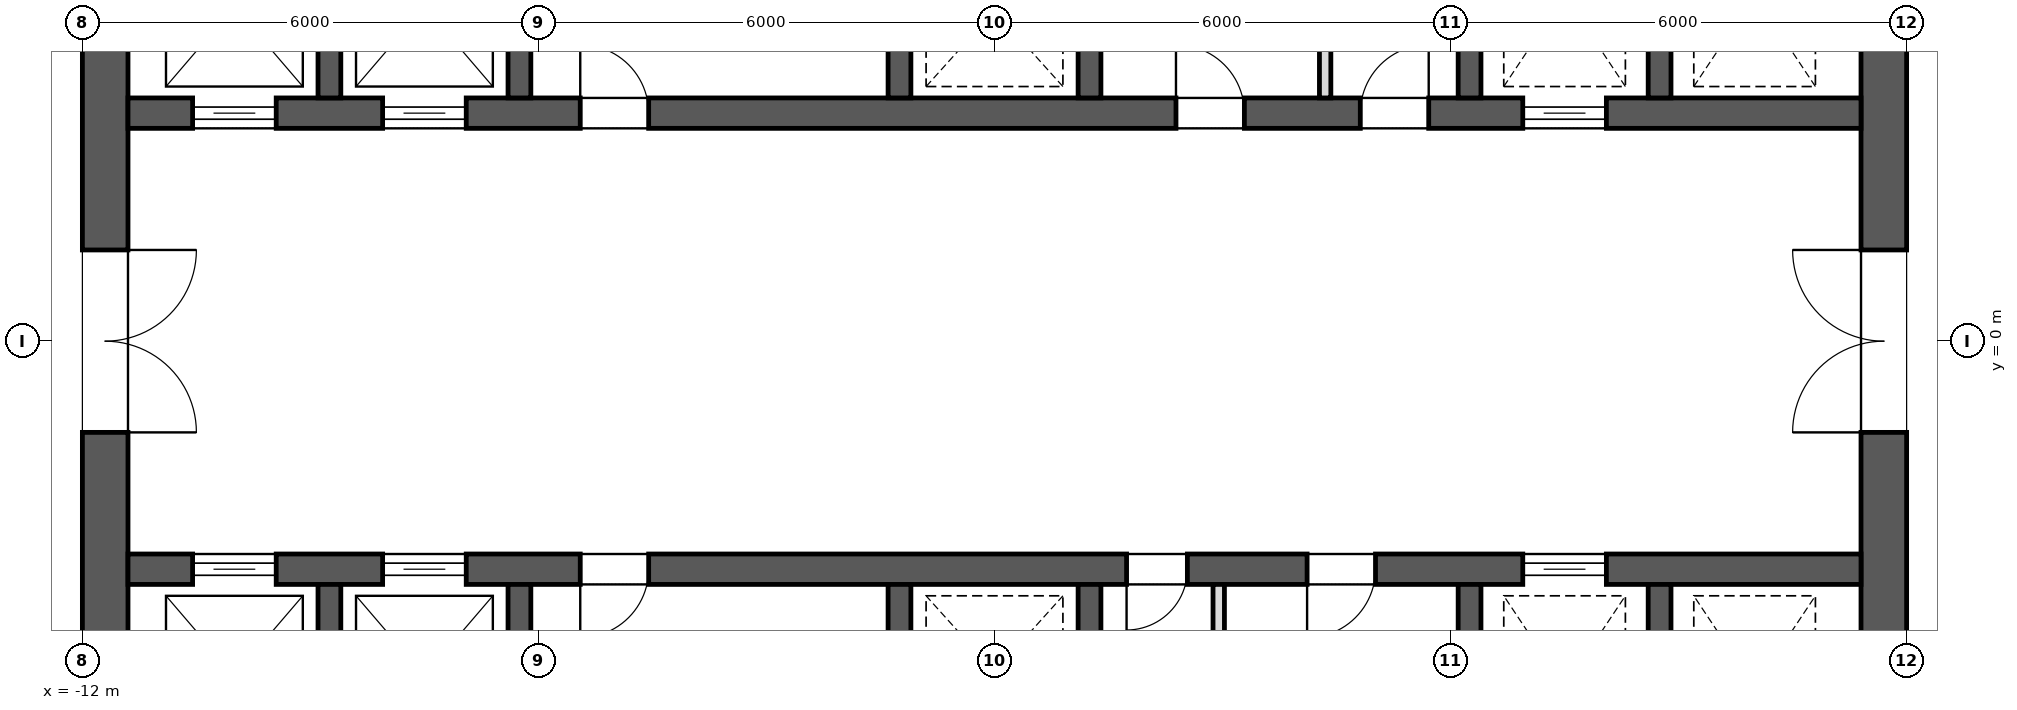
"""IFC4 building model, lengths in metres.
Left out: names, types, materials, properties, quantities, classifications, styles, units other than length and angle.
Written with IfcOpenShell. Run it as: python <this file> out.ifc"""

import sys

from ifc_helpers import new_model, si_unit, direction, frame, frame_2d, origin, place, context, subcontext, project, spatial, rectangle, extrude, element, fill, save


model = new_model("IFC4")
c1 = context("Model", 3, precision=1e-05, world=origin(), true_north=direction((0.0, 1.0)))
c2 = subcontext(c1, "Body", "Model", "MODEL_VIEW")
j1 = project(units=[si_unit("LENGTHUNIT", "METRE"), si_unit("PLANEANGLEUNIT", "RADIAN")], contexts=[c1])
p1 = place(None, origin())
s1 = spatial("IfcSite", under=j1, at=p1, CompositionType="ELEMENT")
p2 = place(p1, origin())
s2 = spatial("IfcBuilding", under=s1, at=p2, CompositionType="ELEMENT")
p3 = place(p2, frame((0.0, 0.0, 280.3)))
s3 = spatial("IfcBuildingStorey", under=s2, at=p3, CompositionType="ELEMENT", Elevation=280.3)
p4 = place(p3, frame((11.7, -11.4, 0.0), z_axis=(0.0, 0.0, 1.0), x_axis=(0.0, 1.0, 0.0)))
e1 = element("IfcWall", 1, at=p4, inside=s3, PredefinedType="SHEAR", context=c2, shape_type="SweptSolid", body=[
    extrude(rectangle(XDim=22.8, YDim=0.6, at=frame_2d((11.4, 0.0))), origin(), (0.0, 0.0, 1.0), 4.0),
])
p5 = place(p4, frame((10.2, 0.0, 0.0)))
e2 = element("IfcOpeningElement", 2, at=p5, cuts=e1, PredefinedType="OPENING", context=c2, shape_type="SweptSolid", body=[
    extrude(rectangle(XDim=2.4, YDim=2.1, at=frame_2d((1.2, 1.05))), frame((0.0, 0.312, 0.0), z_axis=(0.0, -1.0, 0.0), x_axis=(1.0, 0.0, 0.0)), (0.0, 0.0, 1.0), 0.624),
])
p6 = place(p4, frame((19.5, 0.0, 0.0)))
e3 = element("IfcOpeningElement", 3, at=p6, cuts=e1, PredefinedType="OPENING", context=c2, shape_type="SweptSolid", body=[
    extrude(rectangle(XDim=1.2, YDim=2.1, at=frame_2d((0.6, 1.05))), frame((0.0, 0.312, 0.0), z_axis=(0.0, -1.0, 0.0), x_axis=(1.0, 0.0, 0.0)), (0.0, 0.0, 1.0), 0.624),
])
p7 = place(p4, frame((2.1, 0.0, 0.0)))
e4 = element("IfcOpeningElement", 4, at=p7, cuts=e1, PredefinedType="OPENING", context=c2, shape_type="SweptSolid", body=[
    extrude(rectangle(XDim=1.2, YDim=2.1, at=frame_2d((0.6, 1.05))), frame((0.0, 0.312, 0.0), z_axis=(0.0, -1.0, 0.0), x_axis=(1.0, 0.0, 0.0)), (0.0, 0.0, 1.0), 0.624),
])
p8 = place(p3, frame((-11.7, -11.4, 0.0), z_axis=(0.0, 0.0, 1.0), x_axis=(0.0, 1.0, 0.0)))
e5 = element("IfcWall", 5, at=p8, inside=s3, PredefinedType="SHEAR", context=c2, shape_type="SweptSolid", body=[
    extrude(rectangle(XDim=22.8, YDim=0.6, at=frame_2d((11.4, 0.0))), origin(), (0.0, 0.0, 1.0), 4.0),
])
p9 = place(p8, frame((10.2, 0.0, 0.0)))
e6 = element("IfcOpeningElement", 6, at=p9, cuts=e5, PredefinedType="OPENING", context=c2, shape_type="SweptSolid", body=[
    extrude(rectangle(XDim=2.4, YDim=2.1, at=frame_2d((1.2, 1.05))), frame((0.0, 0.312, 0.0), z_axis=(0.0, -1.0, 0.0), x_axis=(1.0, 0.0, 0.0)), (0.0, 0.0, 1.0), 0.624),
])
p10 = place(p8, frame((18.925, 0.0, 0.0)))
e7 = element("IfcOpeningElement", 7, at=p10, cuts=e5, PredefinedType="OPENING", context=c2, shape_type="SweptSolid", body=[
    extrude(rectangle(XDim=1.2, YDim=2.1, at=frame_2d((0.6, 1.05))), frame((0.0, 0.312, 0.0), z_axis=(0.0, -1.0, 0.0), x_axis=(1.0, 0.0, 0.0)), (0.0, 0.0, 1.0), 0.624),
])
p11 = place(p8, frame((2.675, 0.0, 0.0)))
e8 = element("IfcOpeningElement", 8, at=p11, cuts=e5, PredefinedType="OPENING", context=c2, shape_type="SweptSolid", body=[
    extrude(rectangle(XDim=1.2, YDim=2.1, at=frame_2d((0.6, 1.05))), frame((0.0, 0.312, 0.0), z_axis=(0.0, -1.0, 0.0), x_axis=(1.0, 0.0, 0.0)), (0.0, 0.0, 1.0), 0.624),
])
p12 = place(p3, frame((-11.4, 3.0, 0.0), z_axis=(0.0, 0.0, 1.0), x_axis=(1.0, 0.0, 0.0)))
e9 = element("IfcWall", 9, at=p12, inside=s3, PredefinedType="SHEAR", context=c2, shape_type="SweptSolid", body=[
    extrude(rectangle(XDim=22.8, YDim=0.4, at=frame_2d((11.4, 0.0))), origin(), (0.0, 0.0, 1.0), 4.0),
])
p13 = place(p12, frame((0.85, 0.0, 0.0)))
e10 = element("IfcOpeningElement", 10, at=p13, cuts=e9, PredefinedType="OPENING", context=c2, shape_type="SweptSolid", body=[
    extrude(rectangle(XDim=1.1, YDim=2.1, at=frame_2d((0.55, 1.05))), frame((0.0, 0.212, 0.0), z_axis=(0.0, -1.0, 0.0), x_axis=(1.0, 0.0, 0.0)), (0.0, 0.0, 1.0), 0.424),
])
p14 = place(p12, frame((3.35, 0.0, 0.0)))
e11 = element("IfcOpeningElement", 11, at=p14, cuts=e9, PredefinedType="OPENING", context=c2, shape_type="SweptSolid", body=[
    extrude(rectangle(XDim=1.1, YDim=2.1, at=frame_2d((0.55, 1.05))), frame((0.0, 0.212, 0.0), z_axis=(0.0, -1.0, 0.0), x_axis=(1.0, 0.0, 0.0)), (0.0, 0.0, 1.0), 0.424),
])
p15 = place(p12, frame((18.35, 0.0, 0.0)))
e12 = element("IfcOpeningElement", 12, at=p15, cuts=e9, PredefinedType="OPENING", context=c2, shape_type="SweptSolid", body=[
    extrude(rectangle(XDim=1.1, YDim=2.1, at=frame_2d((0.55, 1.05))), frame((0.0, 0.212, 0.0), z_axis=(0.0, -1.0, 0.0), x_axis=(1.0, 0.0, 0.0)), (0.0, 0.0, 1.0), 0.424),
])
p16 = place(p12, frame((13.788, 0.0, 0.0)))
e13 = element("IfcOpeningElement", 13, at=p16, cuts=e9, PredefinedType="OPENING", context=c2, shape_type="SweptSolid", body=[
    extrude(rectangle(XDim=0.9, YDim=2.1, at=frame_2d((0.45, 1.05))), frame((0.0, 0.212, 0.0), z_axis=(0.0, -1.0, 0.0), x_axis=(1.0, 0.0, 0.0)), (0.0, 0.0, 1.0), 0.424),
])
p17 = place(p12, frame((16.212, 0.0, 0.0)))
e14 = element("IfcOpeningElement", 14, at=p17, cuts=e9, PredefinedType="OPENING", context=c2, shape_type="SweptSolid", body=[
    extrude(rectangle(XDim=0.9, YDim=2.1, at=frame_2d((0.45, 1.05))), frame((0.0, 0.212, 0.0), z_axis=(0.0, -1.0, 0.0), x_axis=(1.0, 0.0, 0.0)), (0.0, 0.0, 1.0), 0.424),
])
p18 = place(p12, frame((5.95, 0.0, 0.0)))
e15 = element("IfcOpeningElement", 15, at=p18, cuts=e9, PredefinedType="OPENING", context=c2, shape_type="SweptSolid", body=[
    extrude(rectangle(XDim=0.9, YDim=2.1, at=frame_2d((0.45, 1.05))), frame((0.0, 0.212, 0.0), z_axis=(0.0, -1.0, 0.0), x_axis=(1.0, 0.0, 0.0)), (0.0, 0.0, 1.0), 0.424),
])
for number, where, z_axis, x_axis in (
    (16, (-8.75, 3.2, 0.0), (0.0, 0.0, 1.0), (0.0, 1.0, 0.0)),
    (17, (-6.25, 3.2, 0.0), (0.0, 0.0, 1.0), (0.0, 1.0, 0.0)),
    (18, (-1.25, 3.2, 0.0), (0.0, 0.0, 1.0), (0.0, 1.0, 0.0)),
    (19, (1.25, 3.2, 0.0), (0.0, 0.0, 1.0), (0.0, 1.0, 0.0)),
    (20, (6.25, 3.2, 0.0), (0.0, 0.0, 1.0), (0.0, 1.0, 0.0)),
    (21, (8.75, 3.2, 0.0), (0.0, 0.0, 1.0), (0.0, 1.0, 0.0)),
):
    element("IfcWall", number, at=place(p3, frame(where, z_axis=z_axis, x_axis=x_axis)), inside=s3, PredefinedType="SHEAR", context=c2, shape_type="SweptSolid", body=[
        extrude(rectangle(XDim=2.9, YDim=0.3, at=frame_2d((1.45, 0.0))), origin(), (0.0, 0.0, 1.0), 4.0),
    ])
p19 = place(p3, frame((-11.4, -3.0, 0.0), z_axis=(0.0, 0.0, 1.0), x_axis=(1.0, 0.0, 0.0)))
e22 = element("IfcWall", 22, at=p19, inside=s3, PredefinedType="SHEAR", context=c2, shape_type="SweptSolid", body=[
    extrude(rectangle(XDim=22.8, YDim=0.4, at=frame_2d((11.4, 0.0))), origin(), (0.0, 0.0, 1.0), 4.0),
])
p20 = place(p19, frame((0.85, 0.0, 0.0)))
e23 = element("IfcOpeningElement", 23, at=p20, cuts=e22, PredefinedType="OPENING", context=c2, shape_type="SweptSolid", body=[
    extrude(rectangle(XDim=1.1, YDim=2.1, at=frame_2d((0.55, 1.05))), frame((0.0, 0.212, 0.0), z_axis=(0.0, -1.0, 0.0), x_axis=(1.0, 0.0, 0.0)), (0.0, 0.0, 1.0), 0.424),
])
p21 = place(p19, frame((3.35, 0.0, 0.0)))
e24 = element("IfcOpeningElement", 24, at=p21, cuts=e22, PredefinedType="OPENING", context=c2, shape_type="SweptSolid", body=[
    extrude(rectangle(XDim=1.1, YDim=2.1, at=frame_2d((0.55, 1.05))), frame((0.0, 0.212, 0.0), z_axis=(0.0, -1.0, 0.0), x_axis=(1.0, 0.0, 0.0)), (0.0, 0.0, 1.0), 0.424),
])
p22 = place(p19, frame((18.35, 0.0, 0.0)))
e25 = element("IfcOpeningElement", 25, at=p22, cuts=e22, PredefinedType="OPENING", context=c2, shape_type="SweptSolid", body=[
    extrude(rectangle(XDim=1.1, YDim=2.1, at=frame_2d((0.55, 1.05))), frame((0.0, 0.212, 0.0), z_axis=(0.0, -1.0, 0.0), x_axis=(1.0, 0.0, 0.0)), (0.0, 0.0, 1.0), 0.424),
])
p23 = place(p19, frame((13.137, 0.0, 0.0)))
e26 = element("IfcOpeningElement", 26, at=p23, cuts=e22, PredefinedType="OPENING", context=c2, shape_type="SweptSolid", body=[
    extrude(rectangle(XDim=0.8, YDim=2.1, at=frame_2d((0.4, 1.05))), frame((0.0, 0.212, 0.0), z_axis=(0.0, -1.0, 0.0), x_axis=(1.0, 0.0, 0.0)), (0.0, 0.0, 1.0), 0.424),
])
p24 = place(p19, frame((15.512, 0.0, 0.0)))
e27 = element("IfcOpeningElement", 27, at=p24, cuts=e22, PredefinedType="OPENING", context=c2, shape_type="SweptSolid", body=[
    extrude(rectangle(XDim=0.9, YDim=2.1, at=frame_2d((0.45, 1.05))), frame((0.0, 0.212, 0.0), z_axis=(0.0, -1.0, 0.0), x_axis=(1.0, 0.0, 0.0)), (0.0, 0.0, 1.0), 0.424),
])
p25 = place(p19, frame((5.95, 0.0, 0.0)))
e28 = element("IfcOpeningElement", 28, at=p25, cuts=e22, PredefinedType="OPENING", context=c2, shape_type="SweptSolid", body=[
    extrude(rectangle(XDim=0.9, YDim=2.1, at=frame_2d((0.45, 1.05))), frame((0.0, 0.212, 0.0), z_axis=(0.0, -1.0, 0.0), x_axis=(1.0, 0.0, 0.0)), (0.0, 0.0, 1.0), 0.424),
])
for number, where, z_axis, x_axis in (
    (29, (-8.75, -6.1, 0.0), (0.0, 0.0, 1.0), (0.0, 1.0, 0.0)),
    (30, (-6.25, -6.1, 0.0), (0.0, 0.0, 1.0), (0.0, 1.0, 0.0)),
    (31, (-1.25, -6.1, 0.0), (0.0, 0.0, 1.0), (0.0, 1.0, 0.0)),
    (32, (1.25, -6.1, 0.0), (0.0, 0.0, 1.0), (0.0, 1.0, 0.0)),
    (33, (6.25, -6.1, 0.0), (0.0, 0.0, 1.0), (0.0, 1.0, 0.0)),
    (34, (8.75, -6.1, 0.0), (0.0, 0.0, 1.0), (0.0, 1.0, 0.0)),
):
    element("IfcWall", number, at=place(p3, frame(where, z_axis=z_axis, x_axis=x_axis)), inside=s3, PredefinedType="SHEAR", context=c2, shape_type="SweptSolid", body=[
        extrude(rectangle(XDim=2.9, YDim=0.3, at=frame_2d((1.45, 0.0))), origin(), (0.0, 0.0, 1.0), 4.0),
    ])
for number, where, z_axis, x_axis in (
    (35, (4.35, 3.2, 0.0), (0.0, 0.0, 1.0), (0.0, 1.0, 0.0)),
    (36, (2.95, -6.1, 0.0), (0.0, 0.0, 1.0), (0.0, 1.0, 0.0)),
):
    element("IfcWall", number, at=place(p3, frame(where, z_axis=z_axis, x_axis=x_axis)), inside=s3, PredefinedType="PARTITIONING", context=c2, shape_type="SweptSolid", body=[
        extrude(rectangle(XDim=2.9, YDim=0.15, at=frame_2d((1.45, 0.0))), origin(), (0.0, 0.0, 1.0), 3.7),
    ])
p26 = place(p13, origin())
e37 = element("IfcDoor", 37, at=p26, inside=s3, OperationType="SLIDING_TO_LEFT", PredefinedType="DOOR", context=c2, shape_type="SweptSolid", body=[
    extrude(rectangle(XDim=1.1, YDim=2.1, at=frame_2d((0.55, 1.05))), frame((0.0, 0.025, 0.0), z_axis=(0.0, -1.0, 0.0), x_axis=(1.0, 0.0, 0.0)), (0.0, 0.0, 1.0), 0.05),
])
fill(e10, e37)
p27 = place(p14, origin())
e38 = element("IfcDoor", 38, at=p27, inside=s3, OperationType="SLIDING_TO_LEFT", PredefinedType="DOOR", context=c2, shape_type="SweptSolid", body=[
    extrude(rectangle(XDim=1.1, YDim=2.1, at=frame_2d((0.55, 1.05))), frame((0.0, 0.025, 0.0), z_axis=(0.0, -1.0, 0.0), x_axis=(1.0, 0.0, 0.0)), (0.0, 0.0, 1.0), 0.05),
])
fill(e11, e38)
p28 = place(p20, origin())
e39 = element("IfcDoor", 39, at=p28, inside=s3, OperationType="SLIDING_TO_LEFT", PredefinedType="DOOR", context=c2, shape_type="SweptSolid", body=[
    extrude(rectangle(XDim=1.1, YDim=2.1, at=frame_2d((0.55, 1.05))), frame((0.0, 0.025, 0.0), z_axis=(0.0, -1.0, 0.0), x_axis=(1.0, 0.0, 0.0)), (0.0, 0.0, 1.0), 0.05),
])
fill(e23, e39)
p29 = place(p21, origin())
e40 = element("IfcDoor", 40, at=p29, inside=s3, OperationType="SLIDING_TO_LEFT", PredefinedType="DOOR", context=c2, shape_type="SweptSolid", body=[
    extrude(rectangle(XDim=1.1, YDim=2.1, at=frame_2d((0.55, 1.05))), frame((0.0, 0.025, 0.0), z_axis=(0.0, -1.0, 0.0), x_axis=(1.0, 0.0, 0.0)), (0.0, 0.0, 1.0), 0.05),
])
fill(e24, e40)
p30 = place(p15, origin())
e41 = element("IfcDoor", 41, at=p30, inside=s3, OperationType="SLIDING_TO_LEFT", PredefinedType="DOOR", context=c2, shape_type="SweptSolid", body=[
    extrude(rectangle(XDim=1.1, YDim=2.1, at=frame_2d((0.55, 1.05))), frame((0.0, 0.025, 0.0), z_axis=(0.0, -1.0, 0.0), x_axis=(1.0, 0.0, 0.0)), (0.0, 0.0, 1.0), 0.05),
])
fill(e12, e41)
p31 = place(p22, origin())
e42 = element("IfcDoor", 42, at=p31, inside=s3, OperationType="SLIDING_TO_LEFT", PredefinedType="DOOR", context=c2, shape_type="SweptSolid", body=[
    extrude(rectangle(XDim=1.1, YDim=2.1, at=frame_2d((0.55, 1.05))), frame((0.0, 0.025, 0.0), z_axis=(0.0, -1.0, 0.0), x_axis=(1.0, 0.0, 0.0)), (0.0, 0.0, 1.0), 0.05),
])
fill(e25, e42)
p32 = place(p9, frame((2.4, 0.0, 0.0), z_axis=(0.0, 0.0, 1.0), x_axis=(-1.0, 0.0, 0.0)))
e43 = element("IfcDoor", 43, at=p32, inside=s3, OperationType="DOUBLE_DOOR_SINGLE_SWING", PredefinedType="DOOR", context=c2, shape_type="SweptSolid", body=[
    extrude(rectangle(XDim=2.4, YDim=2.1, at=frame_2d((1.2, 1.05))), frame((0.0, 0.025, 0.0), z_axis=(0.0, -1.0, 0.0), x_axis=(1.0, 0.0, 0.0)), (0.0, 0.0, 1.0), 0.05),
])
fill(e6, e43)
p33 = place(p5, origin())
e44 = element("IfcDoor", 44, at=p33, inside=s3, OperationType="DOUBLE_DOOR_SINGLE_SWING", PredefinedType="DOOR", context=c2, shape_type="SweptSolid", body=[
    extrude(rectangle(XDim=2.4, YDim=2.1, at=frame_2d((1.2, 1.05))), frame((0.0, 0.025, 0.0), z_axis=(0.0, -1.0, 0.0), x_axis=(1.0, 0.0, 0.0)), (0.0, 0.0, 1.0), 0.05),
])
fill(e2, e44)
p34 = place(p16, origin())
e45 = element("IfcDoor", 45, at=p34, inside=s3, OperationType="SINGLE_SWING_RIGHT", PredefinedType="DOOR", context=c2, shape_type="SweptSolid", body=[
    extrude(rectangle(XDim=0.9, YDim=2.1, at=frame_2d((0.45, 1.05))), frame((0.0, 0.025, 0.0), z_axis=(0.0, -1.0, 0.0), x_axis=(1.0, 0.0, 0.0)), (0.0, 0.0, 1.0), 0.05),
])
fill(e13, e45)
p35 = place(p17, origin())
e46 = element("IfcDoor", 46, at=p35, inside=s3, OperationType="SINGLE_SWING_LEFT", PredefinedType="DOOR", context=c2, shape_type="SweptSolid", body=[
    extrude(rectangle(XDim=0.9, YDim=2.1, at=frame_2d((0.45, 1.05))), frame((0.0, 0.025, 0.0), z_axis=(0.0, -1.0, 0.0), x_axis=(1.0, 0.0, 0.0)), (0.0, 0.0, 1.0), 0.05),
])
fill(e14, e46)
p36 = place(p18, origin())
e47 = element("IfcDoor", 47, at=p36, inside=s3, OperationType="SINGLE_SWING_RIGHT", PredefinedType="DOOR", context=c2, shape_type="SweptSolid", body=[
    extrude(rectangle(XDim=0.9, YDim=2.1, at=frame_2d((0.45, 1.05))), frame((0.0, 0.025, 0.0), z_axis=(0.0, -1.0, 0.0), x_axis=(1.0, 0.0, 0.0)), (0.0, 0.0, 1.0), 0.05),
])
fill(e15, e47)
p37 = place(p23, frame((0.8, 0.0, 0.0), z_axis=(0.0, 0.0, 1.0), x_axis=(-1.0, 0.0, 0.0)))
e48 = element("IfcDoor", 48, at=p37, inside=s3, OperationType="SINGLE_SWING_LEFT", PredefinedType="DOOR", context=c2, shape_type="SweptSolid", body=[
    extrude(rectangle(XDim=0.8, YDim=2.1, at=frame_2d((0.4, 1.05))), frame((0.0, 0.025, 0.0), z_axis=(0.0, -1.0, 0.0), x_axis=(1.0, 0.0, 0.0)), (0.0, 0.0, 1.0), 0.05),
])
fill(e26, e48)
p38 = place(p24, frame((0.9, 0.0, 0.0), z_axis=(0.0, 0.0, 1.0), x_axis=(-1.0, 0.0, 0.0)))
e49 = element("IfcDoor", 49, at=p38, inside=s3, OperationType="SINGLE_SWING_LEFT", PredefinedType="DOOR", context=c2, shape_type="SweptSolid", body=[
    extrude(rectangle(XDim=0.9, YDim=2.1, at=frame_2d((0.45, 1.05))), frame((0.0, 0.025, 0.0), z_axis=(0.0, -1.0, 0.0), x_axis=(1.0, 0.0, 0.0)), (0.0, 0.0, 1.0), 0.05),
])
fill(e27, e49)
p39 = place(p25, frame((0.9, 0.0, 0.0), z_axis=(0.0, 0.0, 1.0), x_axis=(-1.0, 0.0, 0.0)))
e50 = element("IfcDoor", 50, at=p39, inside=s3, OperationType="SINGLE_SWING_LEFT", PredefinedType="DOOR", context=c2, shape_type="SweptSolid", body=[
    extrude(rectangle(XDim=0.9, YDim=2.1, at=frame_2d((0.45, 1.05))), frame((0.0, 0.025, 0.0), z_axis=(0.0, -1.0, 0.0), x_axis=(1.0, 0.0, 0.0)), (0.0, 0.0, 1.0), 0.05),
])
fill(e28, e50)
save(model, sys.argv[1])
